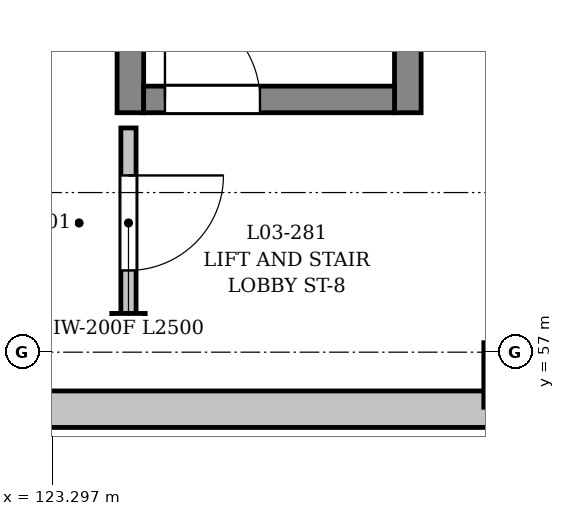
"""IFC4 building model, lengths in metres.
Left out: names, types, materials, properties, quantities, classifications, styles, units other than length and angle.
Written with IfcOpenShell. Run it as: python <this file> out.ifc"""

import sys

from ifc_helpers import new_model, si_unit, direction, frame, frame_2d, origin, origin_2d, place, context, subcontext, project, spatial, rectangle, extrude, element, fill, save


model = new_model("IFC4")
c1 = context("Model", 3, precision=1e-05, world=origin(), true_north=direction((0.0, 1.0)))
c2 = subcontext(c1, "Body", "Model", "MODEL_VIEW")
j1 = project(units=[si_unit("LENGTHUNIT", "METRE"), si_unit("PLANEANGLEUNIT", "RADIAN")], contexts=[c1])
p1 = place(None, origin())
s1 = spatial("IfcSite", under=j1, at=p1, CompositionType="ELEMENT")
p2 = place(p1, origin())
s2 = spatial("IfcBuilding", under=s1, at=p2, CompositionType="ELEMENT")
p3 = place(p2, frame((0.0, 0.0, 10.2)))
s3 = spatial("IfcBuildingStorey", under=s2, at=p3, CompositionType="ELEMENT", Elevation=10.2)
p4 = place(p3, frame((129.4, 56.7, 0.0), z_axis=(0.0, 0.0, 1.0), x_axis=(1.0, 0.0, 0.0)))
e1 = element("IfcColumn", 1, at=p4, inside=s3, PredefinedType="COLUMN", context=c2, shape_type="SweptSolid", body=[
    extrude(rectangle(XDim=0.85, YDim=0.85, at=origin_2d()), origin(), (0.0, 0.0, 1.0), 4.5),
])
p5 = place(p3, frame((144.93, 56.25, 0.0), z_axis=(0.0, 0.0, 1.0), x_axis=(-1.0, 0.0, 0.0)))
e2 = element("IfcWall", 2, at=p5, inside=s3, PredefinedType="SOLIDWALL", context=c2, shape_type="SweptSolid", body=[
    extrude(rectangle(XDim=22.68, YDim=0.48, at=frame_2d((11.34, 0.0))), origin(), (0.0, 0.0, 1.0), 3.49),
])
p6 = place(p5, frame((5.14, 0.0, 0.9)))
e3 = element("IfcOpeningElement", 3, at=p6, cuts=e2, PredefinedType="OPENING", context=c2, shape_type="SweptSolid", body=[
    extrude(rectangle(XDim=1.6, YDim=1.6, at=frame_2d((0.8, 0.8))), frame((0.0, 0.25, 0.0), z_axis=(0.0, -1.0, 0.0), x_axis=(1.0, 0.0, 0.0)), (0.0, 0.0, 1.0), 0.5),
])
p7 = place(p5, frame((8.74, 0.0, 0.9)))
e4 = element("IfcOpeningElement", 4, at=p7, cuts=e2, PredefinedType="OPENING", context=c2, shape_type="SweptSolid", body=[
    extrude(rectangle(XDim=1.6, YDim=1.6, at=frame_2d((0.8, 0.8))), frame((0.0, 0.25, 0.0), z_axis=(0.0, -1.0, 0.0), x_axis=(1.0, 0.0, 0.0)), (0.0, 0.0, 1.0), 0.5),
])
p8 = place(p5, frame((12.34, 0.0, 0.9)))
e5 = element("IfcOpeningElement", 5, at=p8, cuts=e2, PredefinedType="OPENING", context=c2, shape_type="SweptSolid", body=[
    extrude(rectangle(XDim=1.6, YDim=1.6, at=frame_2d((0.8, 0.8))), frame((0.0, 0.25, 0.0), z_axis=(0.0, -1.0, 0.0), x_axis=(1.0, 0.0, 0.0)), (0.0, 0.0, 1.0), 0.5),
])
for number, where, z_axis, x_axis in (
    (6, (127.975, 60.15, 0.0), (0.0, 0.0, 1.0), (0.0, 1.0, 0.0)),
    (7, (124.325, 69.45, 0.0), (0.0, 0.0, 1.0), (0.0, -1.0, 0.0)),
):
    element("IfcWall", number, at=place(p3, frame(where, z_axis=z_axis, x_axis=x_axis)), inside=s3, PredefinedType="SHEAR", context=c2, shape_type="SweptSolid", body=[
        extrude(rectangle(XDim=9.3, YDim=0.35, at=frame_2d((4.65, 0.0))), origin(), (0.0, 0.0, 1.0), 4.5),
    ])
p9 = place(p3, frame((124.5, 60.325, 0.0), z_axis=(0.0, 0.0, 1.0), x_axis=(1.0, 0.0, 0.0)))
e8 = element("IfcWall", 8, at=p9, inside=s3, PredefinedType="SHEAR", context=c2, shape_type="SweptSolid", body=[
    extrude(rectangle(XDim=3.3, YDim=0.35, at=frame_2d((1.65, 0.0))), origin(), (0.0, 0.0, 1.0), 4.5),
])
p10 = place(p9, frame((0.28, 0.0, 0.0)))
e9 = element("IfcOpeningElement", 9, at=p10, cuts=e8, PredefinedType="OPENING", context=c2, shape_type="SweptSolid", body=[
    extrude(rectangle(XDim=1.25, YDim=2.2, at=frame_2d((0.625, 1.1))), frame((0.0, 0.185, 0.0), z_axis=(0.0, -1.0, 0.0), x_axis=(1.0, 0.0, 0.0)), (0.0, 0.0, 1.0), 0.37),
])
p11 = place(p3, frame((124.3, 59.95, 0.0), z_axis=(0.0, 0.0, 1.0), x_axis=(0.0, -1.0, 0.0)))
e10 = element("IfcWall", 10, at=p11, inside=s3, PredefinedType="PARTITIONING", context=c2, shape_type="SweptSolid", body=[
    extrude(rectangle(XDim=2.5, YDim=0.2, at=frame_2d((1.25, 0.0))), origin(), (0.0, 0.0, 1.0), 4.5),
])
p12 = place(p11, frame((0.625, 0.0, 0.0)))
e11 = element("IfcOpeningElement", 11, at=p12, cuts=e10, PredefinedType="OPENING", context=c2, shape_type="SweptSolid", body=[
    extrude(rectangle(XDim=1.25, YDim=2.2, at=frame_2d((0.625, 1.1))), frame((0.0, 0.11, 0.0), z_axis=(0.0, -1.0, 0.0), x_axis=(1.0, 0.0, 0.0)), (0.0, 0.0, 1.0), 0.22),
])
p13 = place(p3, frame((124.08, 57.45, 0.0), z_axis=(0.0, 0.0, 1.0), x_axis=(1.0, 0.0, 0.0)))
e12 = element("IfcWall", 12, at=p13, inside=s3, PredefinedType="PARTITIONING", context=c2, shape_type="SweptSolid", body=[
    extrude(rectangle(XDim=0.44, YDim=0.12, at=frame_2d((0.22, 0.0))), origin(), (0.0, 0.0, 1.0), 4.5),
])
p14 = place(p10, origin())
e13 = element("IfcDoor", 13, at=p14, inside=s3, OperationType="SINGLE_SWING_RIGHT", PredefinedType="DOOR", context=c2, shape_type="SweptSolid", body=[
    extrude(rectangle(XDim=1.25, YDim=2.2, at=frame_2d((0.625, 1.1))), frame((0.0, 0.025, 0.0), z_axis=(0.0, -1.0, 0.0), x_axis=(1.0, 0.0, 0.0)), (0.0, 0.0, 1.0), 0.05),
])
fill(e9, e13)
p15 = place(p12, origin())
e14 = element("IfcDoor", 14, at=p15, inside=s3, OperationType="SINGLE_SWING_LEFT", PredefinedType="DOOR", context=c2, shape_type="SweptSolid", body=[
    extrude(rectangle(XDim=1.25, YDim=2.2, at=frame_2d((0.625, 1.1))), frame((0.0, 0.025, 0.0), z_axis=(0.0, -1.0, 0.0), x_axis=(1.0, 0.0, 0.0)), (0.0, 0.0, 1.0), 0.05),
])
fill(e11, e14)
save(model, sys.argv[1])
